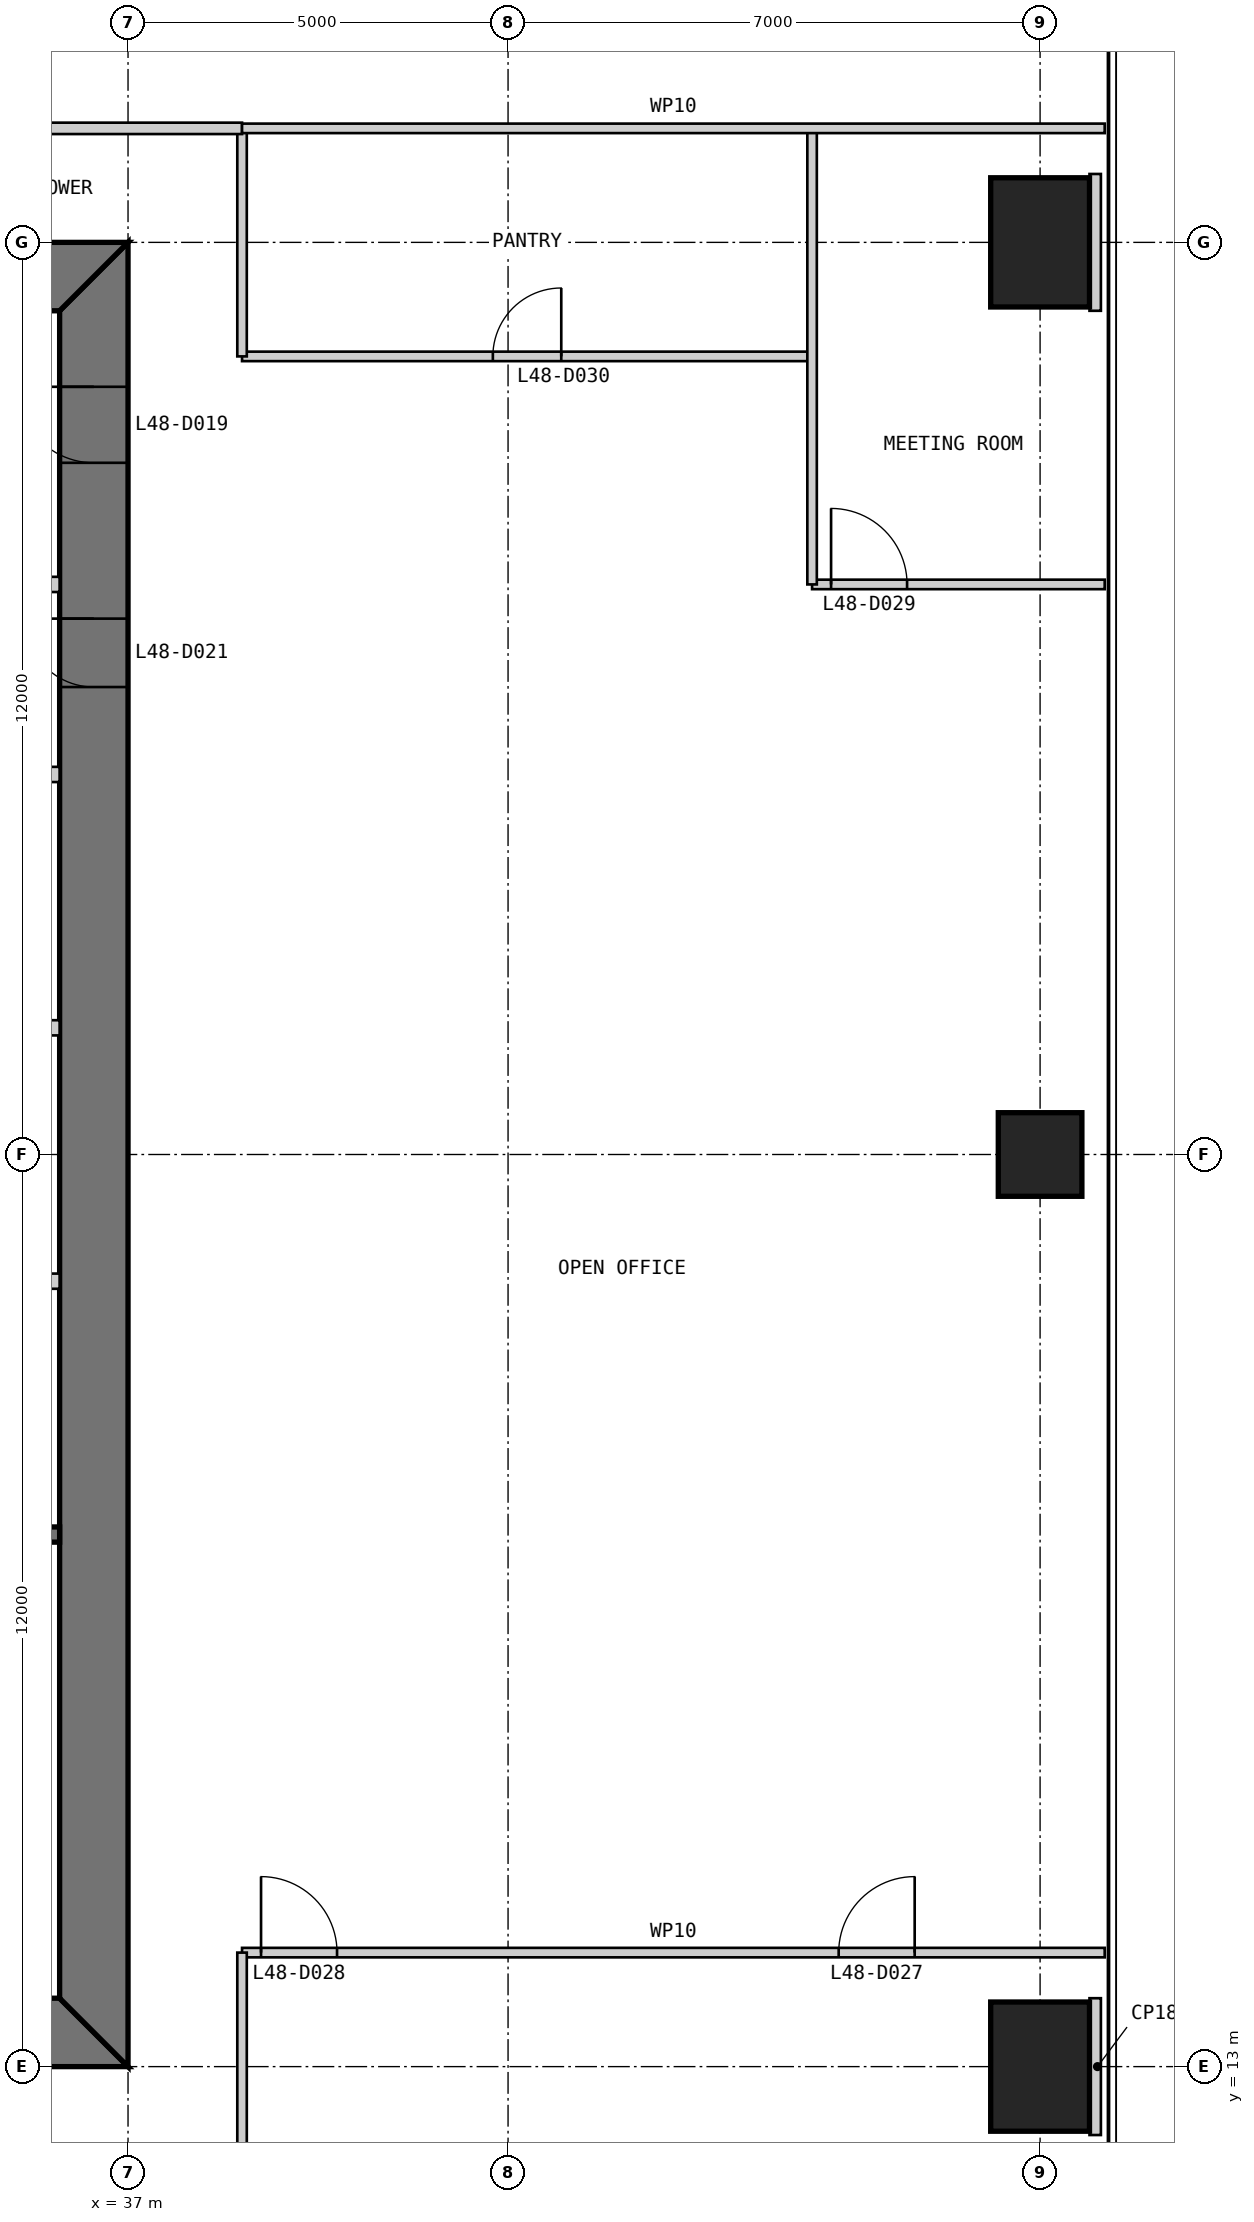
"""IFC4 building model, lengths in metres.
Left out: names, types, materials, properties, quantities, classifications, styles, units other than length and angle.
Written with IfcOpenShell. Run it as: python <this file> out.ifc"""

import sys

from ifc_helpers import new_model, si_unit, direction, frame, frame_2d, origin, origin_2d, place, context, subcontext, project, spatial, polyline, rectangle, outline, extrude, element, fill, save


model = new_model("IFC4")
c1 = context("Model", 3, precision=1e-05, world=origin(), true_north=direction((0.0, 1.0)))
c2 = subcontext(c1, "Body", "Model", "MODEL_VIEW")
j1 = project(units=[si_unit("LENGTHUNIT", "METRE"), si_unit("PLANEANGLEUNIT", "RADIAN")], contexts=[c1])
p1 = place(None, origin())
s1 = spatial("IfcSite", under=j1, at=p1, CompositionType="ELEMENT")
p2 = place(p1, origin())
s2 = spatial("IfcBuilding", under=s1, at=p2, CompositionType="ELEMENT")
p3 = place(p2, frame((0.0, 0.0, 205.8)))
s3 = spatial("IfcBuildingStorey", under=s2, at=p3, CompositionType="ELEMENT", Elevation=205.8)
p4 = place(p3, frame((49.0, 13.0, 0.0), z_axis=(0.0, 0.0, 1.0), x_axis=(1.0, 0.0, 0.0)))
e1 = element("IfcColumn", 1, at=p4, inside=s3, PredefinedType="COLUMN", context=c2, shape_type="SweptSolid", body=[
    extrude(rectangle(XDim=1.3, YDim=1.7, at=origin_2d()), origin(), (0.0, 0.0, 1.0), 4.0),
])
p5 = place(p3, frame((49.0, 25.0, 0.0), z_axis=(0.0, 0.0, 1.0), x_axis=(1.0, 0.0, 0.0)))
e2 = element("IfcColumn", 2, at=p5, inside=s3, PredefinedType="COLUMN", context=c2, shape_type="SweptSolid", body=[
    extrude(rectangle(XDim=1.1, YDim=1.1, at=origin_2d()), origin(), (0.0, 0.0, 1.0), 4.0),
])
p6 = place(p3, frame((49.0, 37.0, 0.0), z_axis=(0.0, 0.0, 1.0), x_axis=(1.0, 0.0, 0.0)))
e3 = element("IfcColumn", 3, at=p6, inside=s3, PredefinedType="COLUMN", context=c2, shape_type="SweptSolid", body=[
    extrude(rectangle(XDim=1.3, YDim=1.7, at=origin_2d()), origin(), (0.0, 0.0, 1.0), 4.0),
])
p7 = place(p3, frame((13.0, 13.45, 0.0), z_axis=(0.0, 0.0, 1.0), x_axis=(1.0, 0.0, 0.0)))
e4 = element("IfcWall", 4, at=p7, inside=s3, PredefinedType="SHEAR", context=c2, shape_type="SweptSolid", body=[
    extrude(outline(polyline([(0.0, -0.45), (24.0, -0.45), (23.1, 0.45), (0.9, 0.45), (0.0, -0.45)])), origin(), (0.0, 0.0, 1.0), 4.0),
])
p8 = place(p7, frame((4.9, 0.0, 0.0)))
e5 = element("IfcOpeningElement", 5, at=p8, cuts=e4, PredefinedType="OPENING", context=c2, shape_type="SweptSolid", body=[
    extrude(rectangle(XDim=1.0, YDim=2.2, at=frame_2d((0.5, 1.1))), frame((0.0, 0.46, 0.0), z_axis=(0.0, -1.0, 0.0), x_axis=(1.0, 0.0, 0.0)), (0.0, 0.0, 1.0), 0.92),
])
p9 = place(p7, frame((8.9, 0.0, 0.0)))
e6 = element("IfcOpeningElement", 6, at=p9, cuts=e4, PredefinedType="OPENING", context=c2, shape_type="SweptSolid", body=[
    extrude(rectangle(XDim=1.1, YDim=2.2, at=frame_2d((0.55, 1.1))), frame((0.0, 0.46, 0.0), z_axis=(0.0, -1.0, 0.0), x_axis=(1.0, 0.0, 0.0)), (0.0, 0.0, 1.0), 0.92),
])
p10 = place(p7, frame((15.05, 0.0, 0.0)))
e7 = element("IfcOpeningElement", 7, at=p10, cuts=e4, PredefinedType="OPENING", context=c2, shape_type="SweptSolid", body=[
    extrude(rectangle(XDim=0.9, YDim=2.2, at=frame_2d((0.45, 1.1))), frame((0.0, 0.46, 0.0), z_axis=(0.0, -1.0, 0.0), x_axis=(1.0, 0.0, 0.0)), (0.0, 0.0, 1.0), 0.92),
])
p11 = place(p7, frame((17.9, 0.0, 0.0)))
e8 = element("IfcOpeningElement", 8, at=p11, cuts=e4, PredefinedType="OPENING", context=c2, shape_type="SweptSolid", body=[
    extrude(rectangle(XDim=1.0, YDim=2.2, at=frame_2d((0.5, 1.1))), frame((0.0, 0.46, 0.0), z_axis=(0.0, -1.0, 0.0), x_axis=(1.0, 0.0, 0.0)), (0.0, 0.0, 1.0), 0.92),
])
p12 = place(p7, frame((21.4, 0.0, 0.0)))
e9 = element("IfcOpeningElement", 9, at=p12, cuts=e4, PredefinedType="OPENING", context=c2, shape_type="SweptSolid", body=[
    extrude(rectangle(XDim=1.0, YDim=2.2, at=frame_2d((0.5, 1.1))), frame((0.0, 0.46, 0.0), z_axis=(0.0, -1.0, 0.0), x_axis=(1.0, 0.0, 0.0)), (0.0, 0.0, 1.0), 0.92),
])
p13 = place(p3, frame((36.55, 13.9, 0.0), z_axis=(0.0, 0.0, 1.0), x_axis=(0.0, 1.0, 0.0)))
e10 = element("IfcWall", 10, at=p13, inside=s3, PredefinedType="SHEAR", context=c2, shape_type="SweptSolid", body=[
    extrude(outline(polyline([(-0.9, -0.45), (23.1, -0.45), (22.2, 0.45), (0.0, 0.45), (-0.9, -0.45)])), origin(), (0.0, 0.0, 1.0), 4.0),
])
p14 = place(p13, frame((20.2, 0.0, 0.0)))
e11 = element("IfcOpeningElement", 11, at=p14, cuts=e10, PredefinedType="OPENING", context=c2, shape_type="SweptSolid", body=[
    extrude(rectangle(XDim=1.0, YDim=2.2, at=frame_2d((0.5, 1.1))), frame((0.0, 0.46, 0.0), z_axis=(0.0, -1.0, 0.0), x_axis=(1.0, 0.0, 0.0)), (0.0, 0.0, 1.0), 0.92),
])
p15 = place(p13, frame((17.25, 0.0, 0.0)))
e12 = element("IfcOpeningElement", 12, at=p15, cuts=e10, PredefinedType="OPENING", context=c2, shape_type="SweptSolid", body=[
    extrude(rectangle(XDim=0.9, YDim=2.2, at=frame_2d((0.45, 1.1))), frame((0.0, 0.46, 0.0), z_axis=(0.0, -1.0, 0.0), x_axis=(1.0, 0.0, 0.0)), (0.0, 0.0, 1.0), 0.92),
])
p16 = place(p3, frame((37.0, 36.55, 0.0), z_axis=(0.0, 0.0, 1.0), x_axis=(-1.0, 0.0, 0.0)))
e13 = element("IfcWall", 13, at=p16, inside=s3, PredefinedType="SHEAR", context=c2, shape_type="SweptSolid", body=[
    extrude(outline(polyline([(0.0, -0.45), (24.0, -0.45), (23.1, 0.45), (0.9, 0.45), (0.0, -0.45)])), origin(), (0.0, 0.0, 1.0), 4.0),
])
p17 = place(p16, frame((4.9, 0.0, 0.0)))
e14 = element("IfcOpeningElement", 14, at=p17, cuts=e13, PredefinedType="OPENING", context=c2, shape_type="SweptSolid", body=[
    extrude(rectangle(XDim=1.0, YDim=2.2, at=frame_2d((0.5, 1.1))), frame((0.0, 0.46, 0.0), z_axis=(0.0, -1.0, 0.0), x_axis=(1.0, 0.0, 0.0)), (0.0, 0.0, 1.0), 0.92),
])
p18 = place(p16, frame((8.9, 0.0, 0.0)))
e15 = element("IfcOpeningElement", 15, at=p18, cuts=e13, PredefinedType="OPENING", context=c2, shape_type="SweptSolid", body=[
    extrude(rectangle(XDim=1.1, YDim=2.2, at=frame_2d((0.55, 1.1))), frame((0.0, 0.46, 0.0), z_axis=(0.0, -1.0, 0.0), x_axis=(1.0, 0.0, 0.0)), (0.0, 0.0, 1.0), 0.92),
])
p19 = place(p16, frame((15.05, 0.0, 0.0)))
e16 = element("IfcOpeningElement", 16, at=p19, cuts=e13, PredefinedType="OPENING", context=c2, shape_type="SweptSolid", body=[
    extrude(rectangle(XDim=0.9, YDim=2.2, at=frame_2d((0.45, 1.1))), frame((0.0, 0.46, 0.0), z_axis=(0.0, -1.0, 0.0), x_axis=(1.0, 0.0, 0.0)), (0.0, 0.0, 1.0), 0.92),
])
p20 = place(p16, frame((17.9, 0.0, 0.0)))
e17 = element("IfcOpeningElement", 17, at=p20, cuts=e13, PredefinedType="OPENING", context=c2, shape_type="SweptSolid", body=[
    extrude(rectangle(XDim=1.0, YDim=2.2, at=frame_2d((0.5, 1.1))), frame((0.0, 0.46, 0.0), z_axis=(0.0, -1.0, 0.0), x_axis=(1.0, 0.0, 0.0)), (0.0, 0.0, 1.0), 0.92),
])
p21 = place(p16, frame((21.4, 0.0, 0.0)))
e18 = element("IfcOpeningElement", 18, at=p21, cuts=e13, PredefinedType="OPENING", context=c2, shape_type="SweptSolid", body=[
    extrude(rectangle(XDim=1.0, YDim=2.2, at=frame_2d((0.5, 1.1))), frame((0.0, 0.46, 0.0), z_axis=(0.0, -1.0, 0.0), x_axis=(1.0, 0.0, 0.0)), (0.0, 0.0, 1.0), 0.92),
])
p22 = place(p3, frame((20.3, 20.0, 0.0), z_axis=(0.0, 0.0, 1.0), x_axis=(1.0, 0.0, 0.0)))
e19 = element("IfcWall", 19, at=p22, inside=s3, PredefinedType="SOLIDWALL", context=c2, shape_type="SweptSolid", body=[
    extrude(rectangle(XDim=15.8, YDim=0.2, at=frame_2d((7.9, 0.0))), origin(), (0.0, 0.0, 1.0), 3.8),
])
for number, where, z_axis, x_axis in (
    (20, (36.1, 30.0, 0.0), (0.0, 0.0, 1.0), (-1.0, 0.0, 0.0)),
    (21, (36.1, 26.667, 0.0), (0.0, 0.0, 1.0), (-1.0, 0.0, 0.0)),
    (22, (36.1, 23.333, 0.0), (0.0, 0.0, 1.0), (-1.0, 0.0, 0.0)),
    (23, (36.1, 32.5, 0.0), (0.0, 0.0, 1.0), (-1.0, 0.0, 0.0)),
):
    element("IfcWall", number, at=place(p3, frame(where, z_axis=z_axis, x_axis=x_axis)), inside=s3, PredefinedType="PARTITIONING", context=c2, shape_type="SweptSolid", body=[
        extrude(rectangle(XDim=2.8, YDim=0.2, at=frame_2d((1.4, 0.0))), origin(), (0.0, 0.0, 1.0), 3.8),
    ])
p23 = place(p3, frame((49.85, 14.5, 0.0), z_axis=(0.0, 0.0, 1.0), x_axis=(-1.0, 0.0, 0.0)))
e24 = element("IfcWall", 24, at=p23, inside=s3, PredefinedType="PARTITIONING", context=c2, shape_type="SweptSolid", body=[
    extrude(rectangle(XDim=11.35, YDim=0.125, at=frame_2d((5.675, 0.0))), origin(), (0.0, 0.0, 1.0), 3.85),
])
p24 = place(p23, frame((2.5, 0.0, 0.0)))
e25 = element("IfcOpeningElement", 25, at=p24, cuts=e24, PredefinedType="OPENING", context=c2, shape_type="SweptSolid", body=[
    extrude(rectangle(XDim=1.0, YDim=2.2, at=frame_2d((0.5, 1.1))), frame((0.0, 0.073, 0.0), z_axis=(0.0, -1.0, 0.0), x_axis=(1.0, 0.0, 0.0)), (0.0, 0.0, 1.0), 0.145),
])
p25 = place(p23, frame((10.1, 0.0, 0.0)))
e26 = element("IfcOpeningElement", 26, at=p25, cuts=e24, PredefinedType="OPENING", context=c2, shape_type="SweptSolid", body=[
    extrude(rectangle(XDim=1.0, YDim=2.2, at=frame_2d((0.5, 1.1))), frame((0.0, 0.073, 0.0), z_axis=(0.0, -1.0, 0.0), x_axis=(1.0, 0.0, 0.0)), (0.0, 0.0, 1.0), 0.145),
])
p26 = place(p3, frame((49.85, 32.5, 0.0), z_axis=(0.0, 0.0, 1.0), x_axis=(-1.0, 0.0, 0.0)))
e27 = element("IfcWall", 27, at=p26, inside=s3, PredefinedType="PARTITIONING", context=c2, shape_type="SweptSolid", body=[
    extrude(rectangle(XDim=3.85, YDim=0.125, at=frame_2d((1.925, 0.0))), origin(), (0.0, 0.0, 1.0), 3.85),
])
p27 = place(p26, frame((2.6, 0.0, 0.0)))
e28 = element("IfcOpeningElement", 28, at=p27, cuts=e27, PredefinedType="OPENING", context=c2, shape_type="SweptSolid", body=[
    extrude(rectangle(XDim=1.0, YDim=2.2, at=frame_2d((0.5, 1.1))), frame((0.0, 0.073, 0.0), z_axis=(0.0, -1.0, 0.0), x_axis=(1.0, 0.0, 0.0)), (0.0, 0.0, 1.0), 0.145),
])
p28 = place(p3, frame((46.0, 35.5, 0.0), z_axis=(0.0, 0.0, 1.0), x_axis=(-1.0, 0.0, 0.0)))
e29 = element("IfcWall", 29, at=p28, inside=s3, PredefinedType="PARTITIONING", context=c2, shape_type="SweptSolid", body=[
    extrude(rectangle(XDim=7.5, YDim=0.125, at=frame_2d((3.75, 0.0))), origin(), (0.0, 0.0, 1.0), 3.85),
])
p29 = place(p28, frame((3.3, 0.0, 0.0)))
e30 = element("IfcOpeningElement", 30, at=p29, cuts=e29, PredefinedType="OPENING", context=c2, shape_type="SweptSolid", body=[
    extrude(rectangle(XDim=0.9, YDim=2.2, at=frame_2d((0.45, 1.1))), frame((0.0, 0.073, 0.0), z_axis=(0.0, -1.0, 0.0), x_axis=(1.0, 0.0, 0.0)), (0.0, 0.0, 1.0), 0.145),
])
p30 = place(p3, frame((46.0, 32.5, 0.0), z_axis=(0.0, 0.0, 1.0), x_axis=(0.0, 1.0, 0.0)))
e31 = element("IfcWall", 31, at=p30, inside=s3, PredefinedType="PARTITIONING", context=c2, shape_type="SweptSolid", body=[
    extrude(rectangle(XDim=6.0, YDim=0.125, at=frame_2d((3.0, 0.0))), origin(), (0.0, 0.0, 1.0), 3.238),
])
for number, where, z_axis, x_axis in (
    (32, (38.5, 11.5, 0.0), (0.0, 0.0, 1.0), (0.0, 1.0, 0.0)),
    (33, (38.5, 35.5, 0.0), (0.0, 0.0, 1.0), (0.0, 1.0, 0.0)),
):
    element("IfcWall", number, at=place(p3, frame(where, z_axis=z_axis, x_axis=x_axis)), inside=s3, PredefinedType="PARTITIONING", context=c2, shape_type="SweptSolid", body=[
        extrude(rectangle(XDim=3.0, YDim=0.125, at=frame_2d((1.5, 0.0))), origin(), (0.0, 0.0, 1.0), 3.85),
    ])
p31 = place(p3, frame((38.5, 38.5, 0.0), z_axis=(0.0, 0.0, 1.0), x_axis=(-1.0, 0.0, 0.0)))
e34 = element("IfcWall", 34, at=p31, inside=s3, PredefinedType="PARTITIONING", context=c2, shape_type="SweptSolid", body=[
    extrude(rectangle(XDim=27.0, YDim=0.15, at=frame_2d((13.5, 0.0))), origin(), (0.0, 0.0, 1.0), 3.85),
])
p32 = place(p31, frame((13.0, 0.0, 0.0)))
e35 = element("IfcOpeningElement", 35, at=p32, cuts=e34, PredefinedType="OPENING", context=c2, shape_type="SweptSolid", body=[
    extrude(rectangle(XDim=1.0, YDim=2.2, at=frame_2d((0.5, 1.1))), frame((0.0, 0.085, 0.0), z_axis=(0.0, -1.0, 0.0), x_axis=(1.0, 0.0, 0.0)), (0.0, 0.0, 1.0), 0.17),
])
p33 = place(p31, frame((4.0, 0.0, 0.0)))
e36 = element("IfcOpeningElement", 36, at=p33, cuts=e34, PredefinedType="OPENING", context=c2, shape_type="SweptSolid", body=[
    extrude(rectangle(XDim=1.0, YDim=2.2, at=frame_2d((0.5, 1.1))), frame((0.0, 0.085, 0.0), z_axis=(0.0, -1.0, 0.0), x_axis=(1.0, 0.0, 0.0)), (0.0, 0.0, 1.0), 0.17),
])
p34 = place(p31, frame((22.0, 0.0, 0.0)))
e37 = element("IfcOpeningElement", 37, at=p34, cuts=e34, PredefinedType="OPENING", context=c2, shape_type="SweptSolid", body=[
    extrude(rectangle(XDim=1.0, YDim=2.2, at=frame_2d((0.5, 1.1))), frame((0.0, 0.085, 0.0), z_axis=(0.0, -1.0, 0.0), x_axis=(1.0, 0.0, 0.0)), (0.0, 0.0, 1.0), 0.17),
])
p35 = place(p31, frame((25.0, 0.0, 0.0)))
e38 = element("IfcOpeningElement", 38, at=p35, cuts=e34, PredefinedType="OPENING", context=c2, shape_type="SweptSolid", body=[
    extrude(rectangle(XDim=1.0, YDim=2.2, at=frame_2d((0.5, 1.1))), frame((0.0, 0.085, 0.0), z_axis=(0.0, -1.0, 0.0), x_axis=(1.0, 0.0, 0.0)), (0.0, 0.0, 1.0), 0.17),
])
p36 = place(p3, frame((49.85, 38.5, 0.0), z_axis=(0.0, 0.0, 1.0), x_axis=(-1.0, 0.0, 0.0)))
e39 = element("IfcWall", 39, at=p36, inside=s3, PredefinedType="PARTITIONING", context=c2, shape_type="SweptSolid", body=[
    extrude(rectangle(XDim=11.35, YDim=0.125, at=frame_2d((5.675, 0.0))), origin(), (0.0, 0.0, 1.0), 3.85),
])
for number, where, z_axis, x_axis in (
    (40, (49.8, 13.0, 0.0), (0.0, 0.0, 1.0), (-1.0, 0.0, 0.0)),
    (41, (49.8, 37.0, 0.0), (0.0, 0.0, 1.0), (-1.0, 0.0, 0.0)),
):
    element("IfcWall", number, at=place(p3, frame(where, z_axis=z_axis, x_axis=x_axis)), inside=s3, PredefinedType="PARTITIONING", context=c2, shape_type="SweptSolid", body=[
        extrude(rectangle(XDim=0.15, YDim=1.8, at=frame_2d((0.075, 0.0))), origin(), (0.0, 0.0, 1.0), 3.85),
    ])
p37 = place(p14, origin())
e42 = element("IfcDoor", 42, at=p37, inside=s3, OperationType="SINGLE_SWING_RIGHT", PredefinedType="DOOR", context=c2, shape_type="SweptSolid", body=[
    extrude(rectangle(XDim=1.0, YDim=2.2, at=frame_2d((0.5, 1.1))), frame((0.0, 0.025, 0.0), z_axis=(0.0, -1.0, 0.0), x_axis=(1.0, 0.0, 0.0)), (0.0, 0.0, 1.0), 0.05),
    extrude(outline(polyline([(0.0, 0.0), (0.04, 0.0), (0.04, 2.16), (0.96, 2.16), (0.96, 0.0), (1.0, 0.0), (1.0, 2.2), (0.0, 2.2), (0.0, 0.0)])), frame((0.0, 0.3, 0.0), z_axis=(0.0, -1.0, 0.0), x_axis=(1.0, 0.0, 0.0)), (0.0, 0.0, 1.0), 0.6),
])
fill(e11, e42)
p38 = place(p15, origin())
e43 = element("IfcDoor", 43, at=p38, inside=s3, OperationType="SINGLE_SWING_RIGHT", PredefinedType="DOOR", context=c2, shape_type="SweptSolid", body=[
    extrude(rectangle(XDim=0.9, YDim=2.2, at=frame_2d((0.45, 1.1))), frame((0.0, 0.025, 0.0), z_axis=(0.0, -1.0, 0.0), x_axis=(1.0, 0.0, 0.0)), (0.0, 0.0, 1.0), 0.05),
    extrude(outline(polyline([(0.0, 0.0), (0.04, 0.0), (0.04, 2.16), (0.86, 2.16), (0.86, 0.0), (0.9, 0.0), (0.9, 2.2), (0.0, 2.2), (0.0, 0.0)])), frame((0.0, 0.3, 0.0), z_axis=(0.0, -1.0, 0.0), x_axis=(1.0, 0.0, 0.0)), (0.0, 0.0, 1.0), 0.6),
])
fill(e12, e43)
p39 = place(p24, frame((1.0, 0.0, 0.0), z_axis=(0.0, 0.0, 1.0), x_axis=(-1.0, 0.0, 0.0)))
e44 = element("IfcDoor", 44, at=p39, inside=s3, OperationType="SINGLE_SWING_RIGHT", PredefinedType="DOOR", context=c2, shape_type="SweptSolid", body=[
    extrude(rectangle(XDim=1.0, YDim=2.2, at=frame_2d((0.5, 1.1))), frame((0.0, 0.025, 0.0), z_axis=(0.0, -1.0, 0.0), x_axis=(1.0, 0.0, 0.0)), (0.0, 0.0, 1.0), 0.05),
])
fill(e25, e44)
p40 = place(p25, frame((1.0, 0.0, 0.0), z_axis=(0.0, 0.0, 1.0), x_axis=(-1.0, 0.0, 0.0)))
e45 = element("IfcDoor", 45, at=p40, inside=s3, OperationType="SINGLE_SWING_LEFT", PredefinedType="DOOR", context=c2, shape_type="SweptSolid", body=[
    extrude(rectangle(XDim=1.0, YDim=2.2, at=frame_2d((0.5, 1.1))), frame((0.0, 0.025, 0.0), z_axis=(0.0, -1.0, 0.0), x_axis=(1.0, 0.0, 0.0)), (0.0, 0.0, 1.0), 0.05),
])
fill(e26, e45)
p41 = place(p27, frame((1.0, 0.0, 0.0), z_axis=(0.0, 0.0, 1.0), x_axis=(-1.0, 0.0, 0.0)))
e46 = element("IfcDoor", 46, at=p41, inside=s3, OperationType="SINGLE_SWING_LEFT", PredefinedType="DOOR", context=c2, shape_type="SweptSolid", body=[
    extrude(rectangle(XDim=1.0, YDim=2.2, at=frame_2d((0.5, 1.1))), frame((0.0, 0.025, 0.0), z_axis=(0.0, -1.0, 0.0), x_axis=(1.0, 0.0, 0.0)), (0.0, 0.0, 1.0), 0.05),
])
fill(e28, e46)
p42 = place(p29, frame((0.9, 0.0, 0.0), z_axis=(0.0, 0.0, 1.0), x_axis=(-1.0, 0.0, 0.0)))
e47 = element("IfcDoor", 47, at=p42, inside=s3, OperationType="SINGLE_SWING_RIGHT", PredefinedType="DOOR", context=c2, shape_type="SweptSolid", body=[
    extrude(rectangle(XDim=0.9, YDim=2.2, at=frame_2d((0.45, 1.1))), frame((0.0, 0.025, 0.0), z_axis=(0.0, -1.0, 0.0), x_axis=(1.0, 0.0, 0.0)), (0.0, 0.0, 1.0), 0.05),
])
fill(e30, e47)
save(model, sys.argv[1])
